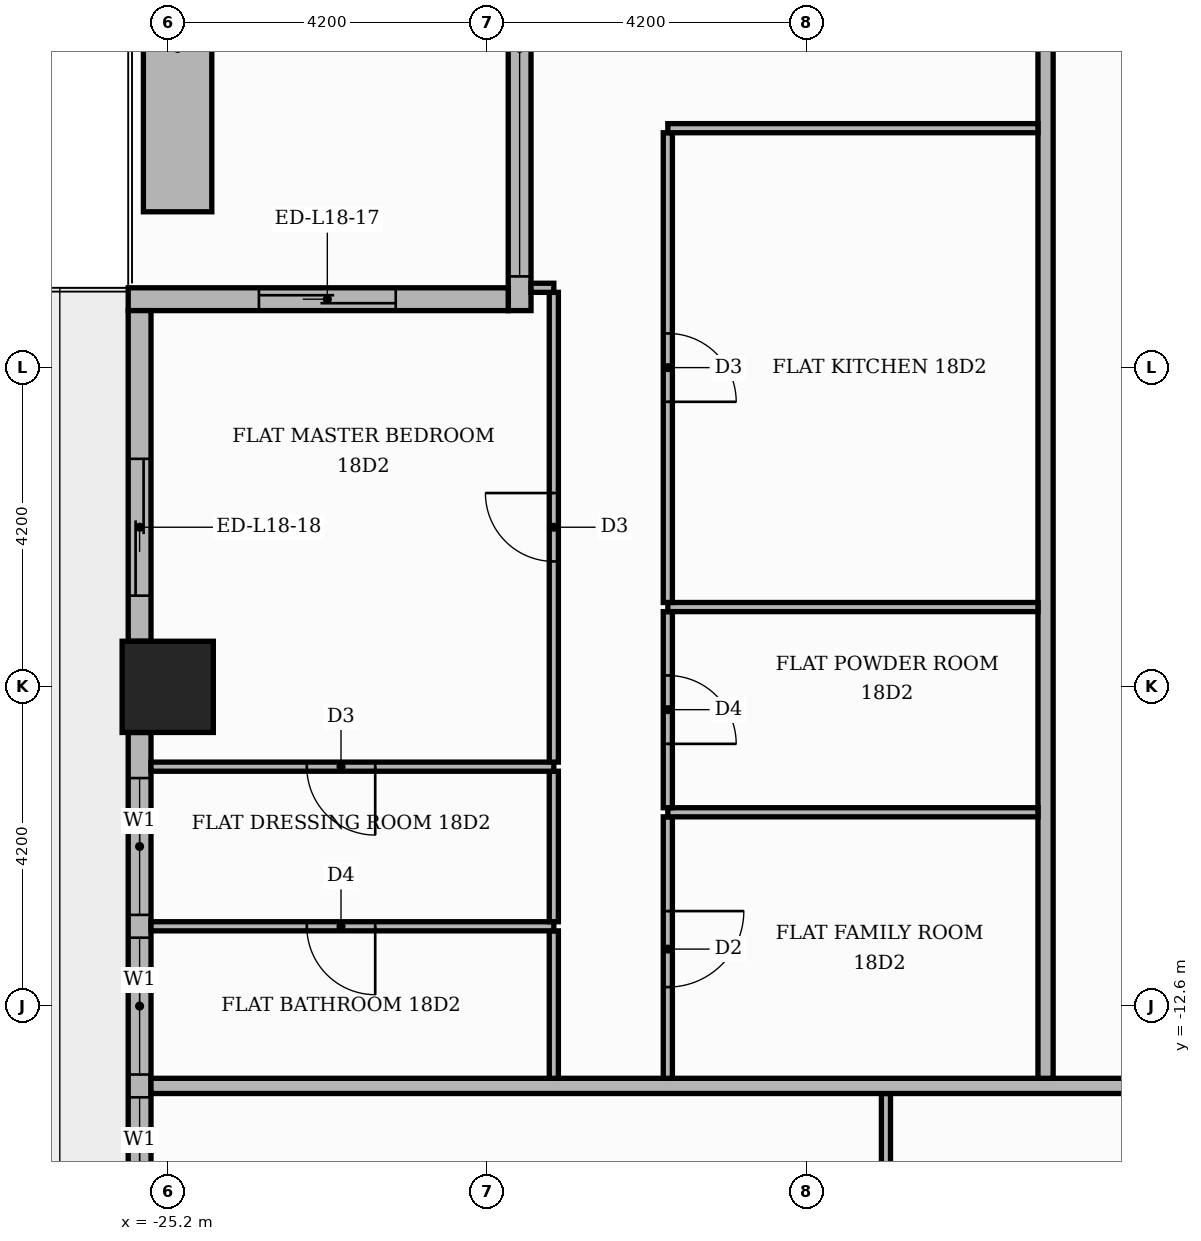
"""IFC4 building model, lengths in metres.
Left out: names, types, materials, properties, quantities, classifications, styles, units other than length and angle.
Written with IfcOpenShell. Run it as: python <this file> out.ifc"""

import sys

from ifc_helpers import new_model, si_unit, direction, frame, frame_2d, origin, origin_2d, place, context, subcontext, project, spatial, rectangle, extrude, element, fill, save


model = new_model("IFC4")
c1 = context("Model", 3, precision=1e-05, world=origin(), true_north=direction((0.0, 1.0)))
c2 = subcontext(c1, "Body", "Model", "MODEL_VIEW")
j1 = project(units=[si_unit("LENGTHUNIT", "METRE"), si_unit("PLANEANGLEUNIT", "RADIAN")], contexts=[c1])
p1 = place(None, origin())
s1 = spatial("IfcSite", under=j1, at=p1, CompositionType="ELEMENT")
p2 = place(p1, origin())
s2 = spatial("IfcBuilding", under=s1, at=p2, CompositionType="ELEMENT")
p3 = place(p2, frame((0.0, 0.0, 79.2)))
s3 = spatial("IfcBuildingStorey", under=s2, at=p3, CompositionType="ELEMENT", Elevation=79.2)
p4 = place(p3, frame((-25.2, -8.4, 0.0), z_axis=(0.0, 0.0, 1.0), x_axis=(1.0, 0.0, 0.0)))
e1 = element("IfcColumn", 1, at=p4, inside=s3, PredefinedType="COLUMN", context=c2, shape_type="SweptSolid", body=[
    extrude(rectangle(XDim=1.2, YDim=1.2, at=origin_2d()), origin(), (0.0, 0.0, 1.0), 3.9),
])
p5 = place(p3, frame((-20.57, 3.15, 0.0), z_axis=(0.0, 0.0, 1.0), x_axis=(0.0, -1.0, 0.0)))
e2 = element("IfcWall", 2, at=p5, inside=s3, PredefinedType="STANDARD", context=c2, shape_type="SweptSolid", body=[
    extrude(rectangle(XDim=6.6, YDim=0.3, at=frame_2d((3.3, 0.0))), origin(), (0.0, 0.0, 1.0), 3.48),
])
p6 = place(p5, frame((0.15, 0.0, 0.9)))
e3 = element("IfcOpeningElement", 3, at=p6, cuts=e2, PredefinedType="OPENING", context=c2, shape_type="SweptSolid", body=[
    extrude(rectangle(XDim=6.0, YDim=2.1, at=frame_2d((3.0, 1.05))), frame((0.0, 0.16, 0.0), z_axis=(0.0, -1.0, 0.0), x_axis=(1.0, 0.0, 0.0)), (0.0, 0.0, 1.0), 0.32),
])
p7 = place(p3, frame((-20.72, -3.3, 0.0), z_axis=(0.0, 0.0, 1.0), x_axis=(-1.0, 0.0, 0.0)))
e4 = element("IfcWall", 4, at=p7, inside=s3, PredefinedType="STANDARD", context=c2, shape_type="SweptSolid", body=[
    extrude(rectangle(XDim=5.0, YDim=0.3, at=frame_2d((2.5, 0.0))), origin(), (0.0, 0.0, 1.0), 3.48),
])
p8 = place(p7, frame((1.48, 0.0, 0.0)))
e5 = element("IfcOpeningElement", 5, at=p8, cuts=e4, PredefinedType="OPENING", context=c2, shape_type="SweptSolid", body=[
    extrude(rectangle(XDim=1.8, YDim=2.4, at=frame_2d((0.9, 1.2))), frame((0.0, 0.16, 0.0), z_axis=(0.0, -1.0, 0.0), x_axis=(1.0, 0.0, 0.0)), (0.0, 0.0, 1.0), 0.32),
])
p9 = place(p3, frame((-25.57, -3.45, 0.0), z_axis=(0.0, 0.0, 1.0), x_axis=(0.0, -1.0, 0.0)))
e6 = element("IfcWall", 6, at=p9, inside=s3, PredefinedType="STANDARD", context=c2, shape_type="SweptSolid", body=[
    extrude(rectangle(XDim=4.35, YDim=0.3, at=frame_2d((2.175, 0.0))), origin(), (0.0, 0.0, 1.0), 3.48),
])
p10 = place(p9, frame((1.95, 0.0, 0.0)))
e7 = element("IfcOpeningElement", 7, at=p10, cuts=e6, PredefinedType="OPENING", context=c2, shape_type="SweptSolid", body=[
    extrude(rectangle(XDim=1.8, YDim=2.4, at=frame_2d((0.9, 1.2))), frame((0.0, 0.16, 0.0), z_axis=(0.0, -1.0, 0.0), x_axis=(1.0, 0.0, 0.0)), (0.0, 0.0, 1.0), 0.32),
])
p11 = place(p3, frame((-25.57, -9.0, 0.0), z_axis=(0.0, 0.0, 1.0), x_axis=(0.0, -1.0, 0.0)))
e8 = element("IfcWall", 8, at=p11, inside=s3, PredefinedType="STANDARD", context=c2, shape_type="SweptSolid", body=[
    extrude(rectangle(XDim=7.2, YDim=0.3, at=frame_2d((3.6, 0.0))), origin(), (0.0, 0.0, 1.0), 3.48),
])
p12 = place(p11, frame((0.6, 0.0, 0.9)))
e9 = element("IfcOpeningElement", 9, at=p12, cuts=e8, PredefinedType="OPENING", context=c2, shape_type="SweptSolid", body=[
    extrude(rectangle(XDim=1.8, YDim=2.1, at=frame_2d((0.9, 1.05))), frame((0.0, 0.16, 0.0), z_axis=(0.0, -1.0, 0.0), x_axis=(1.0, 0.0, 0.0)), (0.0, 0.0, 1.0), 0.32),
])
p13 = place(p11, frame((2.7, 0.0, 0.9)))
e10 = element("IfcOpeningElement", 10, at=p13, cuts=e8, PredefinedType="OPENING", context=c2, shape_type="SweptSolid", body=[
    extrude(rectangle(XDim=1.8, YDim=2.1, at=frame_2d((0.9, 1.05))), frame((0.0, 0.16, 0.0), z_axis=(0.0, -1.0, 0.0), x_axis=(1.0, 0.0, 0.0)), (0.0, 0.0, 1.0), 0.32),
])
p14 = place(p11, frame((4.8, 0.0, 0.9)))
e11 = element("IfcOpeningElement", 11, at=p14, cuts=e8, PredefinedType="OPENING", context=c2, shape_type="SweptSolid", body=[
    extrude(rectangle(XDim=1.8, YDim=2.1, at=frame_2d((0.9, 1.05))), frame((0.0, 0.16, 0.0), z_axis=(0.0, -1.0, 0.0), x_axis=(1.0, 0.0, 0.0)), (0.0, 0.0, 1.0), 0.32),
])
p15 = place(p3, frame((-25.07, -2.15, 0.0), z_axis=(0.0, 0.0, 1.0), x_axis=(0.0, 1.0, 0.0)))
e12 = element("IfcWall", 12, at=p15, inside=s3, PredefinedType="MOVABLE", context=c2, shape_type="SweptSolid", body=[
    extrude(rectangle(XDim=4.3, YDim=0.9, at=frame_2d((2.15, 0.0))), origin(), (0.0, 0.0, 1.0), 0.6),
])
p16 = place(p3, frame((-15.75, -20.06, 0.0), z_axis=(0.0, 0.0, 1.0), x_axis=(0.0, 1.0, 0.0)))
e13 = element("IfcWall", 13, at=p16, inside=s3, PredefinedType="PARTITIONING", context=c2, shape_type="SweptSolid", body=[
    extrude(rectangle(XDim=6.31, YDim=0.12, at=frame_2d((3.155, 0.0))), origin(), (0.0, 0.0, 1.0), 3.48),
])
p17 = place(p16, frame((2.725, 0.0, 0.0)))
e14 = element("IfcOpeningElement", 14, at=p17, cuts=e13, PredefinedType="OPENING", context=c2, shape_type="SweptSolid", body=[
    extrude(rectangle(XDim=0.9, YDim=2.1, at=frame_2d((0.45, 1.05))), frame((0.0, 0.07, 0.0), z_axis=(0.0, -1.0, 0.0), x_axis=(1.0, 0.0, 0.0)), (0.0, 0.0, 1.0), 0.14),
])
p18 = place(p3, frame((-25.42, -13.65, 0.0), z_axis=(0.0, 0.0, 1.0), x_axis=(1.0, 0.0, 0.0)))
e15 = element("IfcWall", 15, at=p18, inside=s3, PredefinedType="PARTITIONING", context=c2, shape_type="SweptSolid", body=[
    extrude(rectangle(XDim=39.07, YDim=0.2, at=frame_2d((19.535, 0.0))), origin(), (0.0, 0.0, 1.0), 3.48),
])
p19 = place(p18, frame((13.32, 0.0, 0.0)))
e16 = element("IfcOpeningElement", 16, at=p19, cuts=e15, PredefinedType="OPENING", context=c2, shape_type="SweptSolid", body=[
    extrude(rectangle(XDim=1.1, YDim=2.4, at=frame_2d((0.55, 1.2))), frame((0.0, 0.11, 0.0), z_axis=(0.0, -1.0, 0.0), x_axis=(1.0, 0.0, 0.0)), (0.0, 0.0, 1.0), 0.22),
])
p20 = place(p3, frame((-20.12, -13.55, 0.0), z_axis=(0.0, 0.0, 1.0), x_axis=(0.0, 1.0, 0.0)))
e17 = element("IfcWall", 17, at=p20, inside=s3, PredefinedType="PARTITIONING", context=c2, shape_type="SweptSolid", body=[
    extrude(rectangle(XDim=1.94, YDim=0.12, at=frame_2d((0.97, 0.0))), origin(), (0.0, 0.0, 1.0), 3.48),
])
p21 = place(p3, frame((-18.62, -13.55, 0.0), z_axis=(0.0, 0.0, 1.0), x_axis=(0.0, 1.0, 0.0)))
e18 = element("IfcWall", 18, at=p21, inside=s3, PredefinedType="PARTITIONING", context=c2, shape_type="SweptSolid", body=[
    extrude(rectangle(XDim=3.44, YDim=0.12, at=frame_2d((1.72, 0.0))), origin(), (0.0, 0.0, 1.0), 3.48),
])
p22 = place(p21, frame((1.2, 0.0, 0.0)))
e19 = element("IfcOpeningElement", 19, at=p22, cuts=e18, PredefinedType="OPENING", context=c2, shape_type="SweptSolid", body=[
    extrude(rectangle(XDim=1.0, YDim=2.1, at=frame_2d((0.5, 1.05))), frame((0.0, 0.07, 0.0), z_axis=(0.0, -1.0, 0.0), x_axis=(1.0, 0.0, 0.0)), (0.0, 0.0, 1.0), 0.14),
])
p23 = place(p3, frame((-13.65, -13.55, 0.0), z_axis=(0.0, 0.0, 1.0), x_axis=(0.0, 1.0, 0.0)))
e20 = element("IfcWall", 20, at=p23, inside=s3, PredefinedType="PARTITIONING", context=c2, shape_type="SweptSolid", body=[
    extrude(rectangle(XDim=18.7, YDim=0.2, at=frame_2d((9.35, 0.0))), origin(), (0.0, 0.0, 1.0), 3.48),
])
p24 = place(p23, frame((14.05, 0.0, 0.0)))
e21 = element("IfcOpeningElement", 21, at=p24, cuts=e20, PredefinedType="OPENING", context=c2, shape_type="SweptSolid", body=[
    extrude(rectangle(XDim=1.1, YDim=2.4, at=frame_2d((0.55, 1.2))), frame((0.0, 0.11, 0.0), z_axis=(0.0, -1.0, 0.0), x_axis=(1.0, 0.0, 0.0)), (0.0, 0.0, 1.0), 0.22),
])
p25 = place(p3, frame((-25.42, -11.55, 0.0), z_axis=(0.0, 0.0, 1.0), x_axis=(1.0, 0.0, 0.0)))
e22 = element("IfcWall", 22, at=p25, inside=s3, PredefinedType="PARTITIONING", context=c2, shape_type="SweptSolid", body=[
    extrude(rectangle(XDim=5.3, YDim=0.12, at=frame_2d((2.65, 0.0))), origin(), (0.0, 0.0, 1.0), 3.48),
])
p26 = place(p25, frame((2.05, 0.0, 0.0)))
e23 = element("IfcOpeningElement", 23, at=p26, cuts=e22, PredefinedType="OPENING", context=c2, shape_type="SweptSolid", body=[
    extrude(rectangle(XDim=0.9, YDim=2.1, at=frame_2d((0.45, 1.05))), frame((0.0, 0.07, 0.0), z_axis=(0.0, -1.0, 0.0), x_axis=(1.0, 0.0, 0.0)), (0.0, 0.0, 1.0), 0.14),
])
p27 = place(p3, frame((-20.12, -11.49, 0.0), z_axis=(0.0, 0.0, 1.0), x_axis=(0.0, 1.0, 0.0)))
e24 = element("IfcWall", 24, at=p27, inside=s3, PredefinedType="PARTITIONING", context=c2, shape_type="SweptSolid", body=[
    extrude(rectangle(XDim=1.98, YDim=0.12, at=frame_2d((0.99, 0.0))), origin(), (0.0, 0.0, 1.0), 3.48),
])
p28 = place(p3, frame((-18.62, -10.05, 0.0), z_axis=(0.0, 0.0, 1.0), x_axis=(1.0, 0.0, 0.0)))
e25 = element("IfcWall", 25, at=p28, inside=s3, PredefinedType="PARTITIONING", context=c2, shape_type="SweptSolid", body=[
    extrude(rectangle(XDim=4.87, YDim=0.12, at=frame_2d((2.435, 0.0))), origin(), (0.0, 0.0, 1.0), 3.48),
])
p29 = place(p3, frame((-18.62, -9.99, 0.0), z_axis=(0.0, 0.0, 1.0), x_axis=(0.0, 1.0, 0.0)))
e26 = element("IfcWall", 26, at=p29, inside=s3, PredefinedType="PARTITIONING", context=c2, shape_type="SweptSolid", body=[
    extrude(rectangle(XDim=2.58, YDim=0.12, at=frame_2d((1.29, 0.0))), origin(), (0.0, 0.0, 1.0), 3.48),
])
p30 = place(p29, frame((0.84, 0.0, 0.0)))
e27 = element("IfcOpeningElement", 27, at=p30, cuts=e26, PredefinedType="OPENING", context=c2, shape_type="SweptSolid", body=[
    extrude(rectangle(XDim=0.9, YDim=2.1, at=frame_2d((0.45, 1.05))), frame((0.0, 0.07, 0.0), z_axis=(0.0, -1.0, 0.0), x_axis=(1.0, 0.0, 0.0)), (0.0, 0.0, 1.0), 0.14),
])
p31 = place(p3, frame((-25.42, -9.45, 0.0), z_axis=(0.0, 0.0, 1.0), x_axis=(1.0, 0.0, 0.0)))
e28 = element("IfcWall", 28, at=p31, inside=s3, PredefinedType="PARTITIONING", context=c2, shape_type="SweptSolid", body=[
    extrude(rectangle(XDim=5.3, YDim=0.12, at=frame_2d((2.65, 0.0))), origin(), (0.0, 0.0, 1.0), 3.48),
])
p32 = place(p31, frame((2.05, 0.0, 0.0)))
e29 = element("IfcOpeningElement", 29, at=p32, cuts=e28, PredefinedType="OPENING", context=c2, shape_type="SweptSolid", body=[
    extrude(rectangle(XDim=0.9, YDim=2.1, at=frame_2d((0.45, 1.05))), frame((0.0, 0.07, 0.0), z_axis=(0.0, -1.0, 0.0), x_axis=(1.0, 0.0, 0.0)), (0.0, 0.0, 1.0), 0.14),
])
p33 = place(p3, frame((-20.12, -9.39, 0.0), z_axis=(0.0, 0.0, 1.0), x_axis=(0.0, 1.0, 0.0)))
e30 = element("IfcWall", 30, at=p33, inside=s3, PredefinedType="PARTITIONING", context=c2, shape_type="SweptSolid", body=[
    extrude(rectangle(XDim=6.18, YDim=0.12, at=frame_2d((3.09, 0.0))), origin(), (0.0, 0.0, 1.0), 3.48),
])
p34 = place(p33, frame((2.64, 0.0, 0.0)))
e31 = element("IfcOpeningElement", 31, at=p34, cuts=e30, PredefinedType="OPENING", context=c2, shape_type="SweptSolid", body=[
    extrude(rectangle(XDim=0.9, YDim=2.1, at=frame_2d((0.45, 1.05))), frame((0.0, 0.07, 0.0), z_axis=(0.0, -1.0, 0.0), x_axis=(1.0, 0.0, 0.0)), (0.0, 0.0, 1.0), 0.14),
])
p35 = place(p3, frame((-18.62, -7.35, 0.0), z_axis=(0.0, 0.0, 1.0), x_axis=(1.0, 0.0, 0.0)))
e32 = element("IfcWall", 32, at=p35, inside=s3, PredefinedType="PARTITIONING", context=c2, shape_type="SweptSolid", body=[
    extrude(rectangle(XDim=4.87, YDim=0.12, at=frame_2d((2.435, 0.0))), origin(), (0.0, 0.0, 1.0), 3.48),
])
p36 = place(p3, frame((-18.62, -7.29, 0.0), z_axis=(0.0, 0.0, 1.0), x_axis=(0.0, 1.0, 0.0)))
e33 = element("IfcWall", 33, at=p36, inside=s3, PredefinedType="PARTITIONING", context=c2, shape_type="SweptSolid", body=[
    extrude(rectangle(XDim=6.18, YDim=0.12, at=frame_2d((3.09, 0.0))), origin(), (0.0, 0.0, 1.0), 3.48),
])
p37 = place(p36, frame((2.64, 0.0, 0.0)))
e34 = element("IfcOpeningElement", 34, at=p37, cuts=e33, PredefinedType="OPENING", context=c2, shape_type="SweptSolid", body=[
    extrude(rectangle(XDim=0.9, YDim=2.1, at=frame_2d((0.45, 1.05))), frame((0.0, 0.07, 0.0), z_axis=(0.0, -1.0, 0.0), x_axis=(1.0, 0.0, 0.0)), (0.0, 0.0, 1.0), 0.14),
])
p38 = place(p3, frame((-20.42, -3.15, 0.0), z_axis=(0.0, 0.0, 1.0), x_axis=(1.0, 0.0, 0.0)))
e35 = element("IfcWall", 35, at=p38, inside=s3, PredefinedType="PARTITIONING", context=c2, shape_type="SweptSolid", body=[
    extrude(rectangle(XDim=0.3, YDim=0.12, at=frame_2d((0.15, 0.0))), origin(), (0.0, 0.0, 1.0), 3.48),
])
p39 = place(p3, frame((-18.62, -1.05, 0.0), z_axis=(0.0, 0.0, 1.0), x_axis=(1.0, 0.0, 0.0)))
e36 = element("IfcWall", 36, at=p39, inside=s3, PredefinedType="PARTITIONING", context=c2, shape_type="SweptSolid", body=[
    extrude(rectangle(XDim=4.87, YDim=0.12, at=frame_2d((2.435, 0.0))), origin(), (0.0, 0.0, 1.0), 3.48),
])
p40 = place(p6, origin())
e37 = element("IfcWindow", 37, at=p40, inside=s3, PartitioningType="SINGLE_PANEL", PredefinedType="WINDOW", context=c2, shape_type="SweptSolid", body=[
    extrude(rectangle(XDim=6.0, YDim=2.1, at=frame_2d((3.0, 1.05))), frame((0.0, 0.03, 0.0), z_axis=(0.0, -1.0, 0.0), x_axis=(1.0, 0.0, 0.0)), (0.0, 0.0, 1.0), 0.06),
])
fill(e3, e37)
p41 = place(p8, origin())
e38 = element("IfcDoor", 38, at=p41, inside=s3, OperationType="SLIDING_TO_RIGHT", PredefinedType="DOOR", context=c2, shape_type="SweptSolid", body=[
    extrude(rectangle(XDim=1.8, YDim=2.4, at=frame_2d((0.9, 1.2))), frame((0.0, 0.025, 0.0), z_axis=(0.0, -1.0, 0.0), x_axis=(1.0, 0.0, 0.0)), (0.0, 0.0, 1.0), 0.05),
])
fill(e5, e38)
p42 = place(p10, origin())
e39 = element("IfcDoor", 39, at=p42, inside=s3, OperationType="SLIDING_TO_RIGHT", PredefinedType="DOOR", context=c2, shape_type="SweptSolid", body=[
    extrude(rectangle(XDim=1.8, YDim=2.4, at=frame_2d((0.9, 1.2))), frame((0.0, 0.025, 0.0), z_axis=(0.0, -1.0, 0.0), x_axis=(1.0, 0.0, 0.0)), (0.0, 0.0, 1.0), 0.05),
])
fill(e7, e39)
p43 = place(p12, origin())
e40 = element("IfcWindow", 40, at=p43, inside=s3, PartitioningType="SINGLE_PANEL", PredefinedType="WINDOW", context=c2, shape_type="SweptSolid", body=[
    extrude(rectangle(XDim=1.8, YDim=2.1, at=frame_2d((0.9, 1.05))), frame((0.0, 0.03, 0.0), z_axis=(0.0, -1.0, 0.0), x_axis=(1.0, 0.0, 0.0)), (0.0, 0.0, 1.0), 0.06),
])
fill(e9, e40)
p44 = place(p13, origin())
e41 = element("IfcWindow", 41, at=p44, inside=s3, PartitioningType="SINGLE_PANEL", PredefinedType="WINDOW", context=c2, shape_type="SweptSolid", body=[
    extrude(rectangle(XDim=1.8, YDim=2.1, at=frame_2d((0.9, 1.05))), frame((0.0, 0.03, 0.0), z_axis=(0.0, -1.0, 0.0), x_axis=(1.0, 0.0, 0.0)), (0.0, 0.0, 1.0), 0.06),
])
fill(e10, e41)
p45 = place(p14, origin())
e42 = element("IfcWindow", 42, at=p45, inside=s3, PartitioningType="SINGLE_PANEL", PredefinedType="WINDOW", context=c2, shape_type="SweptSolid", body=[
    extrude(rectangle(XDim=1.8, YDim=2.1, at=frame_2d((0.9, 1.05))), frame((0.0, 0.03, 0.0), z_axis=(0.0, -1.0, 0.0), x_axis=(1.0, 0.0, 0.0)), (0.0, 0.0, 1.0), 0.06),
])
fill(e11, e42)
p46 = place(p37, frame((0.9, 0.0, 0.0), z_axis=(0.0, 0.0, 1.0), x_axis=(-1.0, 0.0, 0.0)))
e43 = element("IfcDoor", 43, at=p46, inside=s3, OperationType="SINGLE_SWING_LEFT", PredefinedType="DOOR", context=c2, shape_type="SweptSolid", body=[
    extrude(rectangle(XDim=0.9, YDim=2.1, at=frame_2d((0.45, 1.05))), frame((0.0, 0.025, 0.0), z_axis=(0.0, -1.0, 0.0), x_axis=(1.0, 0.0, 0.0)), (0.0, 0.0, 1.0), 0.05),
])
fill(e34, e43)
p47 = place(p30, frame((0.9, 0.0, 0.0), z_axis=(0.0, 0.0, 1.0), x_axis=(-1.0, 0.0, 0.0)))
e44 = element("IfcDoor", 44, at=p47, inside=s3, OperationType="SINGLE_SWING_LEFT", PredefinedType="DOOR", context=c2, shape_type="SweptSolid", body=[
    extrude(rectangle(XDim=0.9, YDim=2.1, at=frame_2d((0.45, 1.05))), frame((0.0, 0.025, 0.0), z_axis=(0.0, -1.0, 0.0), x_axis=(1.0, 0.0, 0.0)), (0.0, 0.0, 1.0), 0.05),
])
fill(e27, e44)
p48 = place(p22, frame((1.0, 0.0, 0.0), z_axis=(0.0, 0.0, 1.0), x_axis=(-1.0, 0.0, 0.0)))
e45 = element("IfcDoor", 45, at=p48, inside=s3, OperationType="SINGLE_SWING_RIGHT", PredefinedType="DOOR", context=c2, shape_type="SweptSolid", body=[
    extrude(rectangle(XDim=1.0, YDim=2.1, at=frame_2d((0.5, 1.05))), frame((0.0, 0.025, 0.0), z_axis=(0.0, -1.0, 0.0), x_axis=(1.0, 0.0, 0.0)), (0.0, 0.0, 1.0), 0.05),
])
fill(e19, e45)
p49 = place(p34, origin())
e46 = element("IfcDoor", 46, at=p49, inside=s3, OperationType="SINGLE_SWING_RIGHT", PredefinedType="DOOR", context=c2, shape_type="SweptSolid", body=[
    extrude(rectangle(XDim=0.9, YDim=2.1, at=frame_2d((0.45, 1.05))), frame((0.0, 0.025, 0.0), z_axis=(0.0, -1.0, 0.0), x_axis=(1.0, 0.0, 0.0)), (0.0, 0.0, 1.0), 0.05),
])
fill(e31, e46)
p50 = place(p32, frame((0.9, 0.0, 0.0), z_axis=(0.0, 0.0, 1.0), x_axis=(-1.0, 0.0, 0.0)))
e47 = element("IfcDoor", 47, at=p50, inside=s3, OperationType="SINGLE_SWING_RIGHT", PredefinedType="DOOR", context=c2, shape_type="SweptSolid", body=[
    extrude(rectangle(XDim=0.9, YDim=2.1, at=frame_2d((0.45, 1.05))), frame((0.0, 0.025, 0.0), z_axis=(0.0, -1.0, 0.0), x_axis=(1.0, 0.0, 0.0)), (0.0, 0.0, 1.0), 0.05),
])
fill(e29, e47)
p51 = place(p26, frame((0.9, 0.0, 0.0), z_axis=(0.0, 0.0, 1.0), x_axis=(-1.0, 0.0, 0.0)))
e48 = element("IfcDoor", 48, at=p51, inside=s3, OperationType="SINGLE_SWING_RIGHT", PredefinedType="DOOR", context=c2, shape_type="SweptSolid", body=[
    extrude(rectangle(XDim=0.9, YDim=2.1, at=frame_2d((0.45, 1.05))), frame((0.0, 0.025, 0.0), z_axis=(0.0, -1.0, 0.0), x_axis=(1.0, 0.0, 0.0)), (0.0, 0.0, 1.0), 0.05),
])
fill(e23, e48)
save(model, sys.argv[1])
